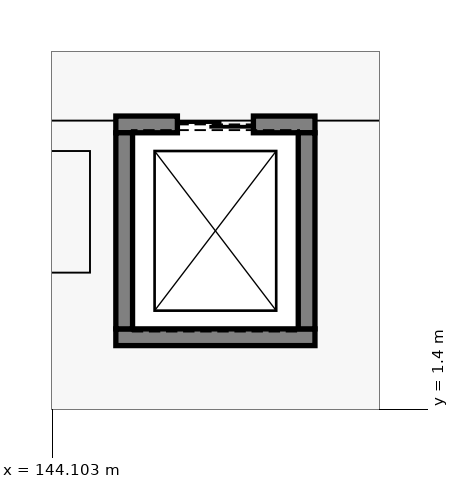
"""IFC4 building model, lengths in metres.
Left out: names, types, materials, properties, quantities, classifications, styles, units other than length and angle.
Written with IfcOpenShell. Run it as: python <this file> out.ifc"""

import sys

from ifc_helpers import new_model, si_unit, direction, frame, frame_2d, origin, place, context, subcontext, project, spatial, rectangle, extrude, element, fill, save


model = new_model("IFC4")
c1 = context("Model", 3, precision=1e-05, world=origin(), true_north=direction((0.0, 1.0)))
c2 = subcontext(c1, "Body", "Model", "MODEL_VIEW")
j1 = project(units=[si_unit("LENGTHUNIT", "METRE"), si_unit("PLANEANGLEUNIT", "RADIAN")], contexts=[c1])
p1 = place(None, origin())
s1 = spatial("IfcSite", under=j1, at=p1, CompositionType="ELEMENT")
p2 = place(p1, origin())
s2 = spatial("IfcBuilding", under=s1, at=p2, CompositionType="ELEMENT")
p3 = place(p2, frame((0.0, 0.0, 4.8)))
s3 = spatial("IfcBuildingStorey", under=s2, at=p3, CompositionType="ELEMENT", Elevation=4.8)
p4 = place(p3, frame((144.94, 2.35, 0.0), z_axis=(0.0, 0.0, 1.0), x_axis=(1.0, 0.0, 0.0)))
e1 = element("IfcWall", 1, at=p4, inside=s3, PredefinedType="SOLIDWALL", context=c2, shape_type="SweptSolid", body=[
    extrude(rectangle(XDim=2.62, YDim=0.22, at=frame_2d((1.31, 0.0))), origin(), (0.0, 0.0, 1.0), 3.92),
])
p5 = place(p3, frame((144.94, 5.15, 0.0), z_axis=(0.0, 0.0, 1.0), x_axis=(1.0, 0.0, 0.0)))
e2 = element("IfcWall", 2, at=p5, inside=s3, PredefinedType="SOLIDWALL", context=c2, shape_type="SweptSolid", body=[
    extrude(rectangle(XDim=2.62, YDim=0.22, at=frame_2d((1.31, 0.0))), origin(), (0.0, 0.0, 1.0), 3.92),
])
p6 = place(p5, frame((0.81, 0.0, 0.0)))
e3 = element("IfcOpeningElement", 3, at=p6, cuts=e2, PredefinedType="OPENING", context=c2, shape_type="SweptSolid", body=[
    extrude(rectangle(XDim=1.0, YDim=2.15, at=frame_2d((0.5, 1.075))), frame((0.0, 0.12, 0.0), z_axis=(0.0, -1.0, 0.0), x_axis=(1.0, 0.0, 0.0)), (0.0, 0.0, 1.0), 0.24),
])
for number, where, z_axis, x_axis in (
    (4, (145.05, 2.46, 0.0), (0.0, 0.0, 1.0), (0.0, 1.0, 0.0)),
    (5, (147.45, 2.46, 0.0), (0.0, 0.0, 1.0), (0.0, 1.0, 0.0)),
):
    element("IfcWall", number, at=place(p3, frame(where, z_axis=z_axis, x_axis=x_axis)), inside=s3, PredefinedType="SOLIDWALL", context=c2, shape_type="SweptSolid", body=[
        extrude(rectangle(XDim=2.58, YDim=0.22, at=frame_2d((1.29, 0.0))), origin(), (0.0, 0.0, 1.0), 3.92),
    ])
p7 = place(p6, origin())
e6 = element("IfcDoor", 6, at=p7, inside=s3, OperationType="SLIDING_TO_LEFT", PredefinedType="DOOR", context=c2, shape_type="SweptSolid", body=[
    extrude(rectangle(XDim=1.0, YDim=2.15, at=frame_2d((0.5, 1.075))), frame((0.0, 0.025, 0.0), z_axis=(0.0, -1.0, 0.0), x_axis=(1.0, 0.0, 0.0)), (0.0, 0.0, 1.0), 0.05),
])
fill(e3, e6)
save(model, sys.argv[1])
